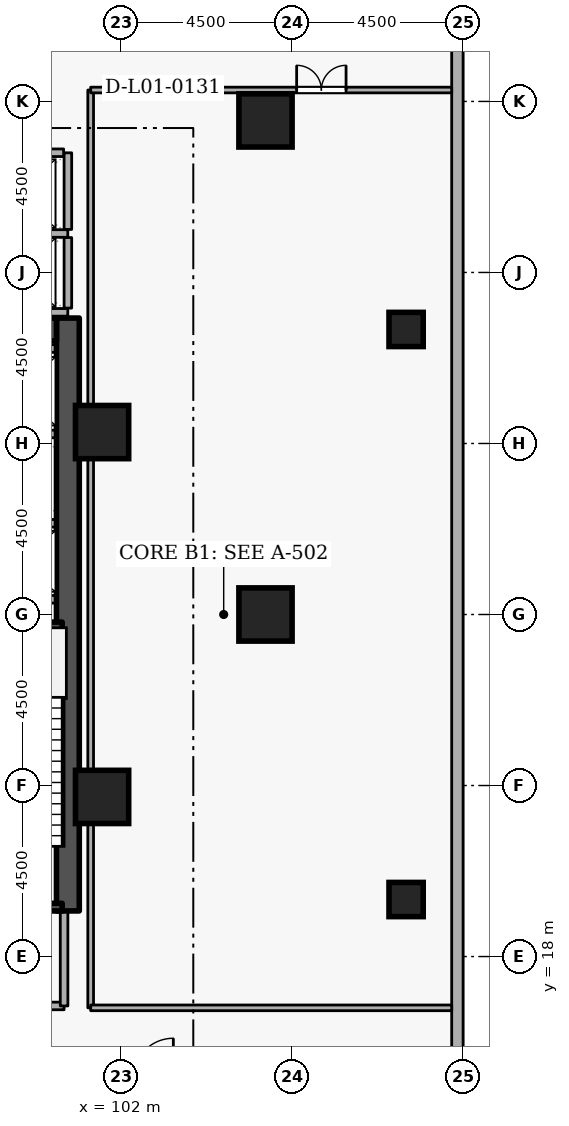
"""IFC4 building model, lengths in metres.
Left out: names, types, materials, properties, quantities, classifications, styles, units other than length and angle.
Written with IfcOpenShell. Run it as: python <this file> out.ifc"""

import sys

from ifc_helpers import new_model, si_unit, direction, frame, frame_2d, origin, origin_2d, place, context, subcontext, project, spatial, rectangle, extrude, element, fill, save


model = new_model("IFC4")
c1 = context("Model", 3, precision=1e-05, world=origin(), true_north=direction((0.0, 1.0)))
c2 = subcontext(c1, "Body", "Model", "MODEL_VIEW")
j1 = project(units=[si_unit("LENGTHUNIT", "METRE"), si_unit("PLANEANGLEUNIT", "RADIAN")], contexts=[c1])
p1 = place(None, origin())
s1 = spatial("IfcSite", under=j1, at=p1, CompositionType="ELEMENT")
p2 = place(p1, origin())
s2 = spatial("IfcBuilding", under=s1, at=p2, CompositionType="ELEMENT")
p3 = place(p2, frame((0.0, 0.0, 4.8)))
s3 = spatial("IfcBuildingStorey", under=s2, at=p3, CompositionType="ELEMENT", Elevation=4.8)
p4 = place(p3, frame((100.6, 19.2, 0.0), z_axis=(0.0, 0.0, 1.0), x_axis=(0.0, 1.0, 0.0)))
e1 = element("IfcWall", 1, at=p4, inside=s3, PredefinedType="SHEAR", context=c2, shape_type="SweptSolid", body=[
    extrude(rectangle(XDim=15.6, YDim=0.6, at=frame_2d((7.8, 0.0))), origin(), (0.0, 0.0, 1.0), 4.8),
])
p5 = place(p3, frame((94.6, 34.5, 0.0), z_axis=(0.0, 0.0, 1.0), x_axis=(1.0, 0.0, 0.0)))
e2 = element("IfcWall", 2, at=p5, inside=s3, PredefinedType="SHEAR", context=c2, shape_type="SweptSolid", body=[
    extrude(rectangle(XDim=5.7, YDim=0.6, at=frame_2d((2.85, 0.0))), origin(), (0.0, 0.0, 1.0), 4.8),
])
for number, where, z_axis, x_axis in (
    (3, (105.8, 27.0, 0.0), (0.0, 0.0, 1.0), (1.0, 0.0, 0.0)),
    (4, (105.8, 40.0, 0.0), (0.0, 0.0, 1.0), (1.0, 0.0, 0.0)),
    (5, (101.5, 22.2, 0.0), (0.0, 0.0, 1.0), (1.0, 0.0, 0.0)),
    (6, (101.5, 31.8, 0.0), (0.0, 0.0, 1.0), (1.0, 0.0, 0.0)),
):
    element("IfcColumn", number, at=place(p3, frame(where, z_axis=z_axis, x_axis=x_axis)), inside=s3, PredefinedType="COLUMN", context=c2, shape_type="SweptSolid", body=[
        extrude(rectangle(XDim=1.4, YDim=1.4, at=origin_2d()), origin(), (0.0, 0.0, 1.0), 4.8),
    ])
for number, where, z_axis, x_axis in (
    (7, (109.5, 19.5, 0.0), (0.0, 0.0, 1.0), (1.0, 0.0, 0.0)),
    (8, (109.5, 34.5, 0.0), (0.0, 0.0, 1.0), (1.0, 0.0, 0.0)),
):
    element("IfcColumn", number, at=place(p3, frame(where, z_axis=z_axis, x_axis=x_axis)), inside=s3, PredefinedType="COLUMN", context=c2, shape_type="SweptSolid", body=[
        extrude(rectangle(XDim=0.9, YDim=0.9, at=origin_2d()), origin(), (0.0, 0.0, 1.0), 4.8),
    ])
p6 = place(p3, frame((110.85, 6.32, 0.0), z_axis=(0.0, 0.0, 1.0), x_axis=(0.0, 1.0, 0.0)))
e9 = element("IfcWall", 9, at=p6, inside=s3, PredefinedType="STANDARD", context=c2, shape_type="SweptSolid", body=[
    extrude(rectangle(XDim=42.86, YDim=0.3, at=frame_2d((21.43, 0.0))), origin(), (0.0, 0.0, 1.0), 3.86),
])
for number, where, z_axis, x_axis in (
    (10, (97.852, 29.4, 0.0), (0.0, 0.0, 1.0), (1.0, 0.0, 0.0)),
    (11, (97.852, 27.4, 0.0), (0.0, 0.0, 1.0), (1.0, 0.0, 0.0)),
    (12, (97.852, 31.75, 0.0), (0.0, 0.0, 1.0), (1.0, 0.0, 0.0)),
    (13, (97.852, 34.0, 0.0), (0.0, 0.0, 1.0), (1.0, 0.0, 0.0)),
):
    element("IfcWall", number, at=place(p3, frame(where, z_axis=z_axis, x_axis=x_axis)), inside=s3, PredefinedType="STANDARD", context=c2, shape_type="SweptSolid", body=[
        extrude(rectangle(XDim=2.436, YDim=0.2, at=frame_2d((1.218, 0.0))), origin(), (0.0, 0.0, 1.0), 4.46),
    ])
for number, where, z_axis, x_axis in (
    (14, (97.852, 37.025, 0.0), (0.0, 0.0, 1.0), (1.0, 0.0, 0.0)),
    (15, (97.852, 34.95, 0.0), (0.0, 0.0, 1.0), (1.0, 0.0, 0.0)),
):
    element("IfcWall", number, at=place(p3, frame(where, z_axis=z_axis, x_axis=x_axis)), inside=s3, PredefinedType="STANDARD", context=c2, shape_type="SweptSolid", body=[
        extrude(rectangle(XDim=2.746, YDim=0.2, at=frame_2d((1.373, 0.0))), origin(), (0.0, 0.0, 1.0), 4.46),
    ])
p7 = place(p3, frame((100.6, 35.062, 0.0), z_axis=(0.0, 0.0, 1.0), x_axis=(0.0, 1.0, 0.0)))
e16 = element("IfcWall", 16, at=p7, inside=s3, PredefinedType="STANDARD", context=c2, shape_type="SweptSolid", body=[
    extrude(rectangle(XDim=1.856, YDim=0.2, at=frame_2d((0.928, 0.0))), origin(), (0.0, 0.0, 1.0), 4.46),
])
p8 = place(p3, frame((100.6, 37.132, 0.0), z_axis=(0.0, 0.0, 1.0), x_axis=(0.0, 1.0, 0.0)))
e17 = element("IfcWall", 17, at=p8, inside=s3, PredefinedType="STANDARD", context=c2, shape_type="SweptSolid", body=[
    extrude(rectangle(XDim=2.016, YDim=0.2, at=frame_2d((1.008, 0.0))), origin(), (0.0, 0.0, 1.0), 4.46),
])
p9 = place(p3, frame((97.852, 39.15, 0.0), z_axis=(0.0, 0.0, 1.0), x_axis=(1.0, 0.0, 0.0)))
e18 = element("IfcWall", 18, at=p9, inside=s3, PredefinedType="STANDARD", context=c2, shape_type="SweptSolid", body=[
    extrude(rectangle(XDim=2.636, YDim=0.2, at=frame_2d((1.318, 0.0))), origin(), (0.0, 0.0, 1.0), 4.46),
])
p10 = place(p3, frame((100.45, 19.3, 0.0), z_axis=(0.0, 0.0, 1.0), x_axis=(-1.0, 0.0, 0.0)))
e19 = element("IfcWall", 19, at=p10, inside=s3, PredefinedType="SHEAR", context=c2, shape_type="SweptSolid", body=[
    extrude(rectangle(XDim=3.35, YDim=0.2, at=frame_2d((1.675, 0.0))), origin(), (0.0, 0.0, 1.0), 4.8),
])
p11 = place(p10, frame((1.125, 0.0, 0.0)))
e20 = element("IfcOpeningElement", 20, at=p11, cuts=e19, PredefinedType="OPENING", context=c2, shape_type="SweptSolid", body=[
    extrude(rectangle(XDim=1.1, YDim=2.1, at=frame_2d((0.55, 1.05))), frame((0.0, 0.11, 0.0), z_axis=(0.0, -1.0, 0.0), x_axis=(1.0, 0.0, 0.0)), (0.0, 0.0, 1.0), 0.22),
])
p12 = place(p3, frame((97.1, 26.7, 0.0), z_axis=(0.0, 0.0, 1.0), x_axis=(1.0, 0.0, 0.0)))
e21 = element("IfcWall", 21, at=p12, inside=s3, PredefinedType="SHEAR", context=c2, shape_type="SweptSolid", body=[
    extrude(rectangle(XDim=3.35, YDim=0.2, at=frame_2d((1.675, 0.0))), origin(), (0.0, 0.0, 1.0), 4.8),
])
p13 = place(p3, frame((95.35, 16.7, 0.0), z_axis=(0.0, 0.0, 1.0), x_axis=(1.0, 0.0, 0.0)))
e22 = element("IfcWall", 22, at=p13, inside=s3, PredefinedType="STANDARD", context=c2, shape_type="SweptSolid", body=[
    extrude(rectangle(XDim=5.15, YDim=0.2, at=frame_2d((2.575, 0.0))), origin(), (0.0, 0.0, 1.0), 4.46),
])
p14 = place(p13, frame((2.0, 0.0, 0.0)))
e23 = element("IfcOpeningElement", 23, at=p14, cuts=e22, PredefinedType="OPENING", context=c2, shape_type="SweptSolid", body=[
    extrude(rectangle(XDim=1.15, YDim=2.1, at=frame_2d((0.575, 1.05))), frame((0.0, 0.11, 0.0), z_axis=(0.0, -1.0, 0.0), x_axis=(1.0, 0.0, 0.0)), (0.0, 0.0, 1.0), 0.22),
])
p15 = place(p3, frame((100.5, 16.7, 0.0), z_axis=(0.0, 0.0, 1.0), x_axis=(0.0, 1.0, 0.0)))
e24 = element("IfcWall", 24, at=p15, inside=s3, PredefinedType="STANDARD", context=c2, shape_type="SweptSolid", body=[
    extrude(rectangle(XDim=2.5, YDim=0.2, at=frame_2d((1.25, 0.0))), origin(), (0.0, 0.0, 1.0), 4.46),
])
p16 = place(p3, frame((101.2, 16.65, 0.0), z_axis=(0.0, 0.0, 1.0), x_axis=(0.0, 1.0, 0.0)))
e25 = element("IfcWall", 25, at=p16, inside=s3, PredefinedType="PARTITIONING", context=c2, shape_type="SweptSolid", body=[
    extrude(rectangle(XDim=24.15, YDim=0.15, at=frame_2d((12.075, 0.0))), origin(), (0.0, 0.0, 1.0), 4.46),
])
p17 = place(p3, frame((101.2, 40.8, 0.0), z_axis=(0.0, 0.0, 1.0), x_axis=(1.0, 0.0, 0.0)))
e26 = element("IfcWall", 26, at=p17, inside=s3, PredefinedType="PARTITIONING", context=c2, shape_type="SweptSolid", body=[
    extrude(rectangle(XDim=9.5, YDim=0.15, at=frame_2d((4.75, 0.0))), origin(), (0.0, 0.0, 1.0), 4.46),
])
p18 = place(p17, frame((5.42, 0.0, 0.0)))
e27 = element("IfcOpeningElement", 27, at=p18, cuts=e26, PredefinedType="OPENING", context=c2, shape_type="SweptSolid", body=[
    extrude(rectangle(XDim=1.3, YDim=2.12, at=frame_2d((0.65, 1.06))), frame((0.0, 0.085, 0.0), z_axis=(0.0, -1.0, 0.0), x_axis=(1.0, 0.0, 0.0)), (0.0, 0.0, 1.0), 0.17),
])
p19 = place(p3, frame((110.7, 16.65, 0.0), z_axis=(0.0, 0.0, 1.0), x_axis=(-1.0, 0.0, 0.0)))
e28 = element("IfcWall", 28, at=p19, inside=s3, PredefinedType="PARTITIONING", context=c2, shape_type="SweptSolid", body=[
    extrude(rectangle(XDim=9.5, YDim=0.15, at=frame_2d((4.75, 0.0))), origin(), (0.0, 0.0, 1.0), 4.46),
])
p20 = place(p18, origin())
e29 = element("IfcDoor", 29, at=p20, inside=s3, OperationType="DOUBLE_DOOR_SINGLE_SWING", PredefinedType="DOOR", context=c2, shape_type="SweptSolid", body=[
    extrude(rectangle(XDim=1.3, YDim=2.12, at=frame_2d((0.65, 1.06))), frame((0.0, 0.025, 0.0), z_axis=(0.0, -1.0, 0.0), x_axis=(1.0, 0.0, 0.0)), (0.0, 0.0, 1.0), 0.05),
])
fill(e27, e29)
save(model, sys.argv[1])
